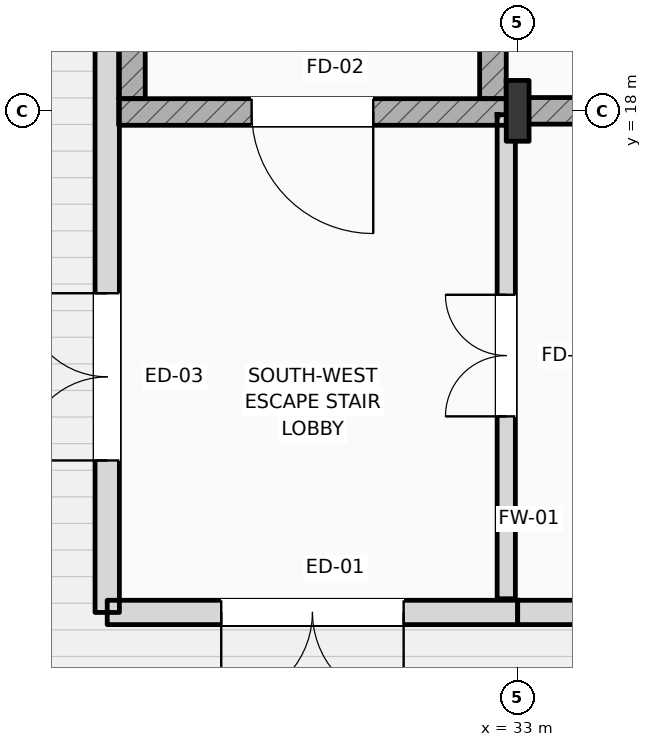
"""IFC4 building model, lengths in metres.
Left out: names, types, materials, properties, quantities, classifications, styles, units other than length and angle.
Written with IfcOpenShell. Run it as: python <this file> out.ifc"""

import sys

from ifc_helpers import new_model, si_unit, direction, frame, frame_2d, origin, origin_2d, place, context, subcontext, project, spatial, rectangle, i_section, extrude, element, fill, save


model = new_model("IFC4")
c1 = context("Model", 3, precision=1e-05, world=origin(), true_north=direction((0.0, 1.0)))
c2 = subcontext(c1, "Body", "Model", "MODEL_VIEW")
j1 = project(units=[si_unit("LENGTHUNIT", "METRE"), si_unit("PLANEANGLEUNIT", "RADIAN")], contexts=[c1])
p1 = place(None, origin())
s1 = spatial("IfcSite", under=j1, at=p1, CompositionType="ELEMENT")
p2 = place(p1, origin())
s2 = spatial("IfcBuilding", under=s1, at=p2, CompositionType="ELEMENT")
p3 = place(p2, origin())
s3 = spatial("IfcBuildingStorey", under=s2, at=p3, CompositionType="ELEMENT", Elevation=0.0)
p4 = place(p3, frame((33.0, 18.0, 0.0), z_axis=(0.0, 0.0, 1.0), x_axis=(1.0, 0.0, 0.0)))
e1 = element("IfcColumn", 1, at=p4, inside=s3, PredefinedType="COLUMN", context=c2, shape_type="SweptSolid", body=[
    extrude(i_section(OverallWidth=0.3, OverallDepth=0.8, WebThickness=0.018, FlangeThickness=0.033, FilletRadius=0.03, at=origin_2d()), origin(), (0.0, 0.0, 1.0), 6.0),
])
p5 = place(p3, frame((27.75, 17.985, 0.0), z_axis=(0.0, 0.0, 1.0), x_axis=(1.0, 0.0, 0.0)))
e2 = element("IfcWall", 2, at=p5, inside=s3, PredefinedType="SHEAR", context=c2, shape_type="SweptSolid", body=[
    extrude(rectangle(XDim=5.1, YDim=0.35, at=frame_2d((2.55, 0.0))), origin(), (0.0, 0.0, 1.0), 6.0),
])
p6 = place(p5, frame((1.75, 0.0, 0.0)))
e3 = element("IfcOpeningElement", 3, at=p6, cuts=e2, PredefinedType="OPENING", context=c2, shape_type="SweptSolid", body=[
    extrude(rectangle(XDim=1.6, YDim=2.2, at=frame_2d((0.8, 1.1))), frame((0.0, 0.185, 0.0), z_axis=(0.0, -1.0, 0.0), x_axis=(1.0, 0.0, 0.0)), (0.0, 0.0, 1.0), 0.37),
])
for number, where, z_axis, x_axis in (
    (4, (27.925, 18.16, 0.0), (0.0, 0.0, 1.0), (0.0, 1.0, 0.0)),
    (5, (32.675, 18.16, 0.0), (0.0, 0.0, 1.0), (0.0, 1.0, 0.0)),
):
    element("IfcWall", number, at=place(p3, frame(where, z_axis=z_axis, x_axis=x_axis)), inside=s3, PredefinedType="SHEAR", context=c2, shape_type="SweptSolid", body=[
        extrude(rectangle(XDim=8.68, YDim=0.35, at=frame_2d((4.34, 0.0))), origin(), (0.0, 0.0, 1.0), 6.0),
    ])
p7 = place(p3, frame((33.0, 18.0, 0.0), z_axis=(0.0, 0.0, 1.0), x_axis=(1.0, 0.0, 0.0)))
e6 = element("IfcWall", 6, at=p7, inside=s3, PredefinedType="SHEAR", context=c2, shape_type="SweptSolid", body=[
    extrude(rectangle(XDim=12.775, YDim=0.35, at=frame_2d((6.387, 0.0))), origin(), (0.0, 0.0, 1.0), 5.7),
])
p8 = place(p3, frame((27.6, 11.4, 0.0), z_axis=(0.0, 0.0, 1.0), x_axis=(1.0, 0.0, 0.0)))
e7 = element("IfcWall", 7, at=p8, inside=s3, PredefinedType="STANDARD", context=c2, shape_type="SweptSolid", body=[
    extrude(rectangle(XDim=5.4, YDim=0.32, at=frame_2d((2.7, 0.0))), origin(), (0.0, 0.0, 1.0), 5.7),
])
p9 = place(p8, frame((1.5, 0.0, 0.0)))
e8 = element("IfcOpeningElement", 8, at=p9, cuts=e7, PredefinedType="OPENING", context=c2, shape_type="SweptSolid", body=[
    extrude(rectangle(XDim=2.4, YDim=2.6, at=frame_2d((1.2, 1.3))), frame((0.0, 0.17, 0.0), z_axis=(0.0, -1.0, 0.0), x_axis=(1.0, 0.0, 0.0)), (0.0, 0.0, 1.0), 0.34),
])
p10 = place(p3, frame((33.0, 11.4, 0.0), z_axis=(0.0, 0.0, 1.0), x_axis=(1.0, 0.0, 0.0)))
e9 = element("IfcWall", 9, at=p10, inside=s3, PredefinedType="STANDARD", context=c2, shape_type="SweptSolid", body=[
    extrude(rectangle(XDim=7.8, YDim=0.32, at=frame_2d((3.9, 0.0))), origin(), (0.0, 0.0, 1.0), 5.7),
])
p11 = place(p10, frame((2.7, 0.0, 0.0)))
e10 = element("IfcOpeningElement", 10, at=p11, cuts=e9, PredefinedType="OPENING", context=c2, shape_type="SweptSolid", body=[
    extrude(rectangle(XDim=2.4, YDim=2.6, at=frame_2d((1.2, 1.3))), frame((0.0, 0.17, 0.0), z_axis=(0.0, -1.0, 0.0), x_axis=(1.0, 0.0, 0.0)), (0.0, 0.0, 1.0), 0.34),
])
p12 = place(p3, frame((27.6, 11.4, 0.0), z_axis=(0.0, 0.0, 1.0), x_axis=(0.0, 1.0, 0.0)))
e11 = element("IfcWall", 11, at=p12, inside=s3, PredefinedType="STANDARD", context=c2, shape_type="SweptSolid", body=[
    extrude(rectangle(XDim=8.6, YDim=0.32, at=frame_2d((4.3, 0.0))), origin(), (0.0, 0.0, 1.0), 5.36),
])
p13 = place(p12, frame((2.0, 0.0, 0.0)))
e12 = element("IfcOpeningElement", 12, at=p13, cuts=e11, PredefinedType="OPENING", context=c2, shape_type="SweptSolid", body=[
    extrude(rectangle(XDim=2.2, YDim=2.5, at=frame_2d((1.1, 1.25))), frame((0.0, 0.17, 0.0), z_axis=(0.0, -1.0, 0.0), x_axis=(1.0, 0.0, 0.0)), (0.0, 0.0, 1.0), 0.34),
])
p14 = place(p3, frame((32.85, 11.58, 0.0), z_axis=(0.0, 0.0, 1.0), x_axis=(0.0, 1.0, 0.0)))
e13 = element("IfcWall", 13, at=p14, inside=s3, PredefinedType="STANDARD", context=c2, shape_type="SweptSolid", body=[
    extrude(rectangle(XDim=6.37, YDim=0.24, at=frame_2d((3.185, 0.0))), origin(), (0.0, 0.0, 1.0), 5.2),
])
p15 = place(p14, frame((2.4, 0.0, 0.0)))
e14 = element("IfcOpeningElement", 14, at=p15, cuts=e13, PredefinedType="OPENING", context=c2, shape_type="SweptSolid", body=[
    extrude(rectangle(XDim=1.6, YDim=2.2, at=frame_2d((0.8, 1.1))), frame((0.0, 0.13, 0.0), z_axis=(0.0, -1.0, 0.0), x_axis=(1.0, 0.0, 0.0)), (0.0, 0.0, 1.0), 0.26),
])
p16 = place(p9, frame((2.4, 0.0, 0.0), z_axis=(0.0, 0.0, 1.0), x_axis=(-1.0, 0.0, 0.0)))
e15 = element("IfcDoor", 15, at=p16, inside=s3, OperationType="DOUBLE_SWING_LEFT", PredefinedType="DOOR", context=c2, shape_type="SweptSolid", body=[
    extrude(rectangle(XDim=2.4, YDim=2.6, at=frame_2d((1.2, 1.3))), frame((0.0, 0.025, 0.0), z_axis=(0.0, -1.0, 0.0), x_axis=(1.0, 0.0, 0.0)), (0.0, 0.0, 1.0), 0.05),
])
fill(e8, e15)
p17 = place(p13, origin())
e16 = element("IfcDoor", 16, at=p17, inside=s3, OperationType="DOUBLE_SWING_LEFT", PredefinedType="DOOR", context=c2, shape_type="SweptSolid", body=[
    extrude(rectangle(XDim=2.2, YDim=2.5, at=frame_2d((1.1, 1.25))), frame((0.0, 0.025, 0.0), z_axis=(0.0, -1.0, 0.0), x_axis=(1.0, 0.0, 0.0)), (0.0, 0.0, 1.0), 0.05),
])
fill(e12, e16)
p18 = place(p6, frame((1.6, 0.0, 0.0), z_axis=(0.0, 0.0, 1.0), x_axis=(-1.0, 0.0, 0.0)))
e17 = element("IfcDoor", 17, at=p18, inside=s3, OperationType="SINGLE_SWING_RIGHT", PredefinedType="DOOR", context=c2, shape_type="SweptSolid", body=[
    extrude(rectangle(XDim=1.6, YDim=2.2, at=frame_2d((0.8, 1.1))), frame((0.0, 0.025, 0.0), z_axis=(0.0, -1.0, 0.0), x_axis=(1.0, 0.0, 0.0)), (0.0, 0.0, 1.0), 0.05),
])
fill(e3, e17)
p19 = place(p15, origin())
e18 = element("IfcDoor", 18, at=p19, inside=s3, OperationType="DOUBLE_SWING_LEFT", PredefinedType="DOOR", context=c2, shape_type="SweptSolid", body=[
    extrude(rectangle(XDim=1.6, YDim=2.2, at=frame_2d((0.8, 1.1))), frame((0.0, 0.025, 0.0), z_axis=(0.0, -1.0, 0.0), x_axis=(1.0, 0.0, 0.0)), (0.0, 0.0, 1.0), 0.05),
])
fill(e14, e18)
save(model, sys.argv[1])
